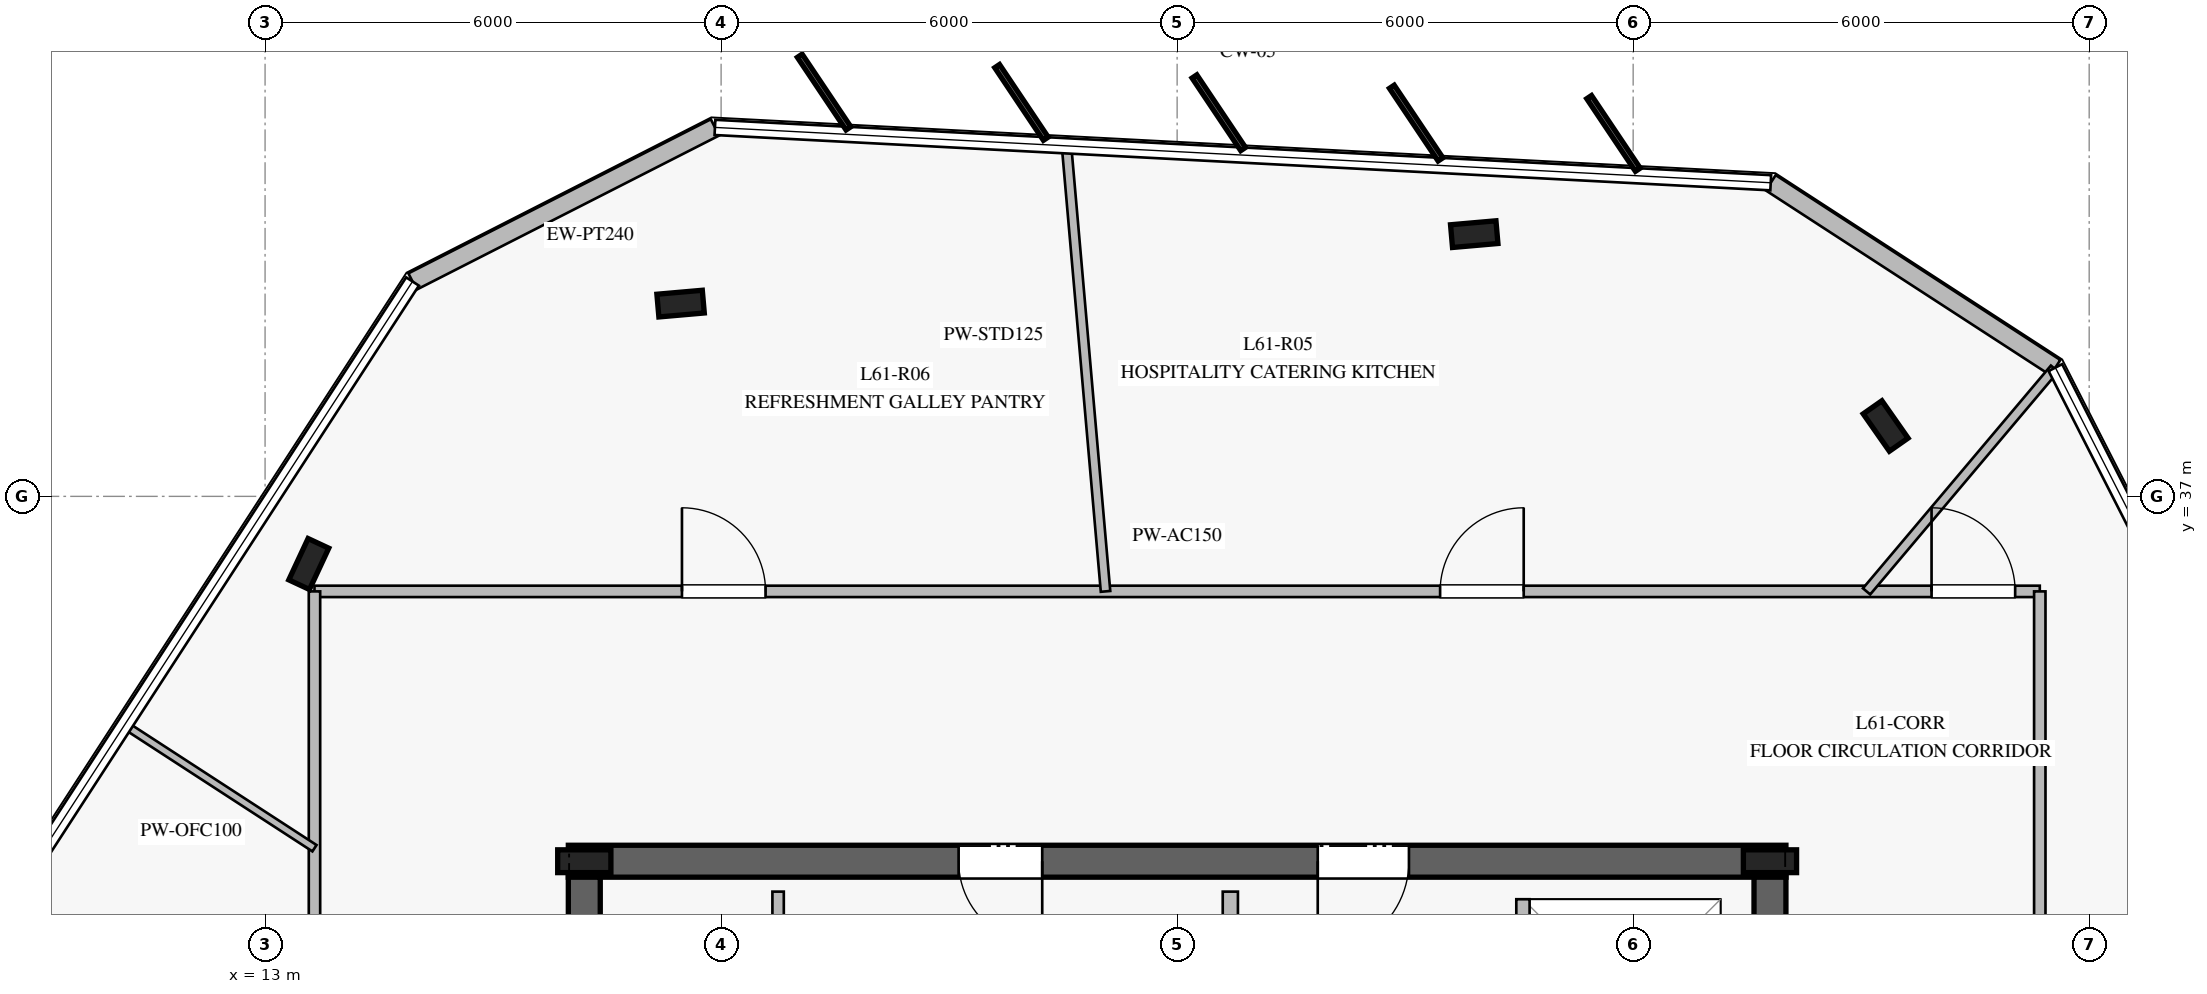
"""IFC4 building model, lengths in metres.
Left out: names, types, materials, properties, quantities, classifications, styles, units other than length and angle.
Written with IfcOpenShell. Run it as: python <this file> out.ifc"""

import sys

from ifc_helpers import new_model, si_unit, direction, frame, frame_2d, origin, origin_2d, place, context, subcontext, project, spatial, rectangle, i_section, extrude, element, fill, save


model = new_model("IFC4")
c1 = context("Model", 3, precision=1e-05, world=origin(), true_north=direction((0.0, 1.0)))
c2 = subcontext(c1, "Body", "Model", "MODEL_VIEW")
j1 = project(units=[si_unit("LENGTHUNIT", "METRE"), si_unit("PLANEANGLEUNIT", "RADIAN")], contexts=[c1])
p1 = place(None, origin())
s1 = spatial("IfcSite", under=j1, at=p1, CompositionType="ELEMENT")
p2 = place(p1, origin())
s2 = spatial("IfcBuilding", under=s1, at=p2, CompositionType="ELEMENT")
p3 = place(p2, frame((0.0, 0.0, 254.2)))
s3 = spatial("IfcBuildingStorey", under=s2, at=p3, CompositionType="ELEMENT", Elevation=254.2)
p4 = place(p3, frame((33.01, 32.2, 0.0), z_axis=(0.0, 0.0, 1.0), x_axis=(-1.0, 0.0, 0.0)))
e1 = element("IfcWall", 1, at=p4, inside=s3, PredefinedType="SHEAR", context=c2, shape_type="SweptSolid", body=[
    extrude(rectangle(XDim=16.02, YDim=0.42, at=frame_2d((8.01, 0.0))), origin(), (0.0, 0.0, 1.0), 3.78),
])
p5 = place(p4, frame((4.96, 0.0, 0.0)))
e2 = element("IfcOpeningElement", 2, at=p5, cuts=e1, PredefinedType="OPENING", context=c2, shape_type="SweptSolid", body=[
    extrude(rectangle(XDim=1.2, YDim=2.25, at=frame_2d((0.6, 1.125))), frame((0.0, 0.22, 0.0), z_axis=(0.0, -1.0, 0.0), x_axis=(1.0, 0.0, 0.0)), (0.0, 0.0, 1.0), 0.44),
])
p6 = place(p4, frame((9.785, 0.0, 0.0)))
e3 = element("IfcOpeningElement", 3, at=p6, cuts=e1, PredefinedType="OPENING", context=c2, shape_type="SweptSolid", body=[
    extrude(rectangle(XDim=1.1, YDim=2.2, at=frame_2d((0.55, 1.1))), frame((0.0, 0.22, 0.0), z_axis=(0.0, -1.0, 0.0), x_axis=(1.0, 0.0, 0.0)), (0.0, 0.0, 1.0), 0.44),
])
p7 = place(p3, frame((17.2, 31.99, 0.0), z_axis=(0.0, 0.0, 1.0), x_axis=(0.0, -1.0, 0.0)))
e4 = element("IfcWall", 4, at=p7, inside=s3, PredefinedType="SHEAR", context=c2, shape_type="SweptSolid", body=[
    extrude(rectangle(XDim=13.98, YDim=0.42, at=frame_2d((6.99, 0.0))), origin(), (0.0, 0.0, 1.0), 3.78),
])
p8 = place(p7, frame((2.14, 0.0, 0.0)))
e5 = element("IfcOpeningElement", 5, at=p8, cuts=e4, PredefinedType="OPENING", context=c2, shape_type="SweptSolid", body=[
    extrude(rectangle(XDim=1.5, YDim=2.2, at=frame_2d((0.75, 1.1))), frame((0.0, 0.22, 0.0), z_axis=(0.0, -1.0, 0.0), x_axis=(1.0, 0.0, 0.0)), (0.0, 0.0, 1.0), 0.44),
])
p9 = place(p3, frame((32.8, 18.01, 0.0), z_axis=(0.0, 0.0, 1.0), x_axis=(0.0, 1.0, 0.0)))
e6 = element("IfcWall", 6, at=p9, inside=s3, PredefinedType="SHEAR", context=c2, shape_type="SweptSolid", body=[
    extrude(rectangle(XDim=13.98, YDim=0.42, at=frame_2d((6.99, 0.0))), origin(), (0.0, 0.0, 1.0), 3.78),
])
for number, where, z_axis, x_axis in (
    (7, (32.8, 32.2, 0.0), (0.0, 0.0, 1.0), (1.0, 0.0, 0.0)),
    (8, (17.2, 32.2, 0.0), (0.0, 0.0, 1.0), (1.0, 0.0, 0.0)),
):
    element("IfcColumn", number, at=place(p3, frame(where, z_axis=z_axis, x_axis=x_axis)), inside=s3, PredefinedType="COLUMN", context=c2, shape_type="SweptSolid", body=[
        extrude(i_section(OverallWidth=0.3, OverallDepth=0.7, WebThickness=0.017, FlangeThickness=0.032, at=origin_2d()), origin(), (0.0, 0.0, 1.0), 4.0),
    ])
for number, where, z_axis, x_axis in (
    (9, (28.909, 40.45, 0.0), (0.0, 0.0, 1.0), (0.996, 0.087, 0.0)),
    (10, (18.467, 39.536, 0.0), (0.0, 0.0, 1.0), (0.996, 0.087, 0.0)),
    (11, (13.575, 36.11, 0.0), (0.0, 0.0, 1.0), (0.423, 0.906, 0.0)),
    (12, (34.322, 37.926, 0.0), (0.0, 0.0, 1.0), (-0.574, 0.819, 0.0)),
):
    element("IfcColumn", number, at=place(p3, frame(where, z_axis=z_axis, x_axis=x_axis)), inside=s3, PredefinedType="COLUMN", context=c2, shape_type="SweptSolid", body=[
        extrude(i_section(OverallWidth=0.3, OverallDepth=0.6, WebThickness=0.015, FlangeThickness=0.03, at=origin_2d()), origin(), (0.0, 0.0, 1.0), 4.0),
    ])
p10 = place(p3, frame((18.919, 41.854, 0.0), z_axis=(0.0, 0.0, 1.0), x_axis=(-0.891034072926, -0.453936428243, 0.0)))
e13 = element("IfcWall", 13, at=p10, inside=s3, PredefinedType="STANDARD", context=c2, shape_type="SweptSolid", body=[
    extrude(rectangle(XDim=4.466, YDim=0.24, at=frame_2d((2.233, 0.0))), origin(), (0.0, 0.0, 1.0), 3.78),
])
p11 = place(p3, frame((36.555, 38.694, 0.0), z_axis=(0.0, 0.0, 1.0), x_axis=(-0.838677137994, 0.544628917893, 0.0)))
e14 = element("IfcWall", 14, at=p11, inside=s3, PredefinedType="STANDARD", context=c2, shape_type="SweptSolid", body=[
    extrude(rectangle(XDim=4.465, YDim=0.24, at=frame_2d((2.233, 0.0))), origin(), (0.0, 0.0, 1.0), 3.78),
])
p12 = place(p3, frame((25.7, 26.65, 0.0), z_axis=(0.0, 0.0, 1.0), x_axis=(0.0, 1.0, 0.0)))
e15 = element("IfcWall", 15, at=p12, inside=s3, PredefinedType="PARTITIONING", context=c2, shape_type="SweptSolid", body=[
    extrude(rectangle(XDim=5.15, YDim=0.2, at=frame_2d((2.575, 0.0))), origin(), (0.0, 0.0, 1.0), 3.78),
])
p13 = place(p3, frame((19.75, 29.39, 0.0), z_axis=(0.0, 0.0, 1.0), x_axis=(0.0, 1.0, 0.0)))
e16 = element("IfcWall", 16, at=p13, inside=s3, PredefinedType="PARTITIONING", context=c2, shape_type="SweptSolid", body=[
    extrude(rectangle(XDim=2.41, YDim=0.15, at=frame_2d((1.205, 0.0))), origin(), (0.0, 0.0, 1.0), 3.78),
])
p14 = place(p3, frame((29.55, 29.1, 0.0), z_axis=(0.0, 0.0, 1.0), x_axis=(0.0, 1.0, 0.0)))
e17 = element("IfcWall", 17, at=p14, inside=s3, PredefinedType="PARTITIONING", context=c2, shape_type="SweptSolid", body=[
    extrude(rectangle(XDim=2.6, YDim=0.175, at=frame_2d((1.3, 0.0))), origin(), (0.0, 0.0, 1.0), 3.78),
])
p15 = place(p14, frame((0.7, 0.0, 0.0)))
e18 = element("IfcOpeningElement", 18, at=p15, cuts=e17, PredefinedType="OPENING", context=c2, shape_type="SweptSolid", body=[
    extrude(rectangle(XDim=1.2, YDim=2.2, at=frame_2d((0.6, 1.1))), frame((0.0, 0.098, 0.0), z_axis=(0.0, -1.0, 0.0), x_axis=(1.0, 0.0, 0.0)), (0.0, 0.0, 1.0), 0.195),
])
p16 = place(p3, frame((13.65, 35.75, 0.0), z_axis=(0.0, 0.0, 1.0), x_axis=(1.0, 0.0, 0.0)))
e19 = element("IfcWall", 19, at=p16, inside=s3, PredefinedType="PARTITIONING", context=c2, shape_type="SweptSolid", body=[
    extrude(rectangle(XDim=22.7, YDim=0.15, at=frame_2d((11.35, 0.0))), origin(), (0.0, 0.0, 1.0), 2.43),
])
p17 = place(p16, frame((21.276, 0.0, 0.0)))
e20 = element("IfcOpeningElement", 20, at=p17, cuts=e19, PredefinedType="OPENING", context=c2, shape_type="SweptSolid", body=[
    extrude(rectangle(XDim=1.1, YDim=2.2, at=frame_2d((0.55, 1.1))), frame((0.0, 0.085, 0.0), z_axis=(0.0, -1.0, 0.0), x_axis=(1.0, 0.0, 0.0)), (0.0, 0.0, 1.0), 0.17),
])
p18 = place(p16, frame((14.81, 0.0, 0.0)))
e21 = element("IfcOpeningElement", 21, at=p18, cuts=e19, PredefinedType="OPENING", context=c2, shape_type="SweptSolid", body=[
    extrude(rectangle(XDim=1.1, YDim=2.2, at=frame_2d((0.55, 1.1))), frame((0.0, 0.085, 0.0), z_axis=(0.0, -1.0, 0.0), x_axis=(1.0, 0.0, 0.0)), (0.0, 0.0, 1.0), 0.17),
])
p19 = place(p16, frame((4.835, 0.0, 0.0)))
e22 = element("IfcOpeningElement", 22, at=p19, cuts=e19, PredefinedType="OPENING", context=c2, shape_type="SweptSolid", body=[
    extrude(rectangle(XDim=1.1, YDim=2.2, at=frame_2d((0.55, 1.1))), frame((0.0, 0.085, 0.0), z_axis=(0.0, -1.0, 0.0), x_axis=(1.0, 0.0, 0.0)), (0.0, 0.0, 1.0), 0.17),
])
p20 = place(p3, frame((36.35, 35.75, 0.0), z_axis=(0.0, 0.0, 1.0), x_axis=(0.0, -1.0, 0.0)))
e23 = element("IfcWall", 23, at=p20, inside=s3, PredefinedType="PARTITIONING", context=c2, shape_type="SweptSolid", body=[
    extrude(rectangle(XDim=21.5, YDim=0.15, at=frame_2d((10.75, 0.0))), origin(), (0.0, 0.0, 1.0), 3.05),
])
p21 = place(p20, frame((14.888, 0.0, 0.0)))
e24 = element("IfcOpeningElement", 24, at=p21, cuts=e23, PredefinedType="OPENING", context=c2, shape_type="SweptSolid", body=[
    extrude(rectangle(XDim=1.1, YDim=2.2, at=frame_2d((0.55, 1.1))), frame((0.0, 0.085, 0.0), z_axis=(0.0, -1.0, 0.0), x_axis=(1.0, 0.0, 0.0)), (0.0, 0.0, 1.0), 0.17),
])
p22 = place(p3, frame((13.65, 14.25, 0.0), z_axis=(0.0, 0.0, 1.0), x_axis=(0.0, 1.0, 0.0)))
e25 = element("IfcWall", 25, at=p22, inside=s3, PredefinedType="PARTITIONING", context=c2, shape_type="SweptSolid", body=[
    extrude(rectangle(XDim=21.5, YDim=0.15, at=frame_2d((10.75, 0.0))), origin(), (0.0, 0.0, 1.0), 2.4),
])
p23 = place(p22, frame((12.281, 0.0, 0.0)))
e26 = element("IfcOpeningElement", 26, at=p23, cuts=e25, PredefinedType="OPENING", context=c2, shape_type="SweptSolid", body=[
    extrude(rectangle(XDim=1.1, YDim=2.2, at=frame_2d((0.55, 1.1))), frame((0.0, 0.085, 0.0), z_axis=(0.0, -1.0, 0.0), x_axis=(1.0, 0.0, 0.0)), (0.0, 0.0, 1.0), 0.17),
])
p24 = place(p3, frame((24.058, 35.75, 0.0), z_axis=(0.0, 0.0, 1.0), x_axis=(-0.087283069054, 0.996183550284, 0.0)))
e27 = element("IfcWall", 27, at=p24, inside=s3, PredefinedType="PARTITIONING", context=c2, shape_type="SweptSolid", body=[
    extrude(rectangle(XDim=5.868, YDim=0.125, at=frame_2d((2.934, 0.0))), origin(), (0.0, 0.0, 1.0), 3.28),
])
p25 = place(p3, frame((13.65, 32.371, 0.0), z_axis=(0.0, 0.0, 1.0), x_axis=(-0.838620526754, 0.544716083943, 0.0)))
e28 = element("IfcWall", 28, at=p25, inside=s3, PredefinedType="MOVABLE", context=c2, shape_type="SweptSolid", body=[
    extrude(rectangle(XDim=2.963, YDim=0.1, at=frame_2d((1.481, 0.0))), origin(), (0.0, 0.0, 1.0), 2.43),
])
p26 = place(p3, frame((34.071, 35.75, 0.0), z_axis=(0.0, 0.0, 1.0), x_axis=(0.644862803999, 0.764298347518, 0.0)))
e29 = element("IfcWall", 29, at=p26, inside=s3, PredefinedType="PARTITIONING", context=c2, shape_type="SweptSolid", body=[
    extrude(rectangle(XDim=3.835, YDim=0.125, at=frame_2d((1.917, 0.0))), origin(), (0.0, 0.0, 1.0), 3.28),
])
p27 = place(p5, origin())
e30 = element("IfcDoor", 30, at=p27, inside=s3, OperationType="SINGLE_SWING_RIGHT", PredefinedType="DOOR", context=c2, shape_type="SweptSolid", body=[
    extrude(rectangle(XDim=1.2, YDim=2.25, at=frame_2d((0.6, 1.125))), frame((0.0, 0.025, 0.0), z_axis=(0.0, -1.0, 0.0), x_axis=(1.0, 0.0, 0.0)), (0.0, 0.0, 1.0), 0.05),
])
fill(e2, e30)
p28 = place(p6, origin())
e31 = element("IfcDoor", 31, at=p28, inside=s3, OperationType="SINGLE_SWING_LEFT", PredefinedType="DOOR", context=c2, shape_type="SweptSolid", body=[
    extrude(rectangle(XDim=1.1, YDim=2.2, at=frame_2d((0.55, 1.1))), frame((0.0, 0.025, 0.0), z_axis=(0.0, -1.0, 0.0), x_axis=(1.0, 0.0, 0.0)), (0.0, 0.0, 1.0), 0.05),
])
fill(e3, e31)
p29 = place(p17, origin())
e32 = element("IfcDoor", 32, at=p29, inside=s3, OperationType="SINGLE_SWING_LEFT", PredefinedType="DOOR", context=c2, shape_type="SweptSolid", body=[
    extrude(rectangle(XDim=1.1, YDim=2.2, at=frame_2d((0.55, 1.1))), frame((0.0, 0.025, 0.0), z_axis=(0.0, -1.0, 0.0), x_axis=(1.0, 0.0, 0.0)), (0.0, 0.0, 1.0), 0.05),
])
fill(e20, e32)
p30 = place(p18, origin())
e33 = element("IfcDoor", 33, at=p30, inside=s3, OperationType="SINGLE_SWING_RIGHT", PredefinedType="DOOR", context=c2, shape_type="SweptSolid", body=[
    extrude(rectangle(XDim=1.1, YDim=2.2, at=frame_2d((0.55, 1.1))), frame((0.0, 0.025, 0.0), z_axis=(0.0, -1.0, 0.0), x_axis=(1.0, 0.0, 0.0)), (0.0, 0.0, 1.0), 0.05),
])
fill(e21, e33)
p31 = place(p19, origin())
e34 = element("IfcDoor", 34, at=p31, inside=s3, OperationType="SINGLE_SWING_LEFT", PredefinedType="DOOR", context=c2, shape_type="SweptSolid", body=[
    extrude(rectangle(XDim=1.1, YDim=2.2, at=frame_2d((0.55, 1.1))), frame((0.0, 0.025, 0.0), z_axis=(0.0, -1.0, 0.0), x_axis=(1.0, 0.0, 0.0)), (0.0, 0.0, 1.0), 0.05),
])
fill(e22, e34)
save(model, sys.argv[1])
